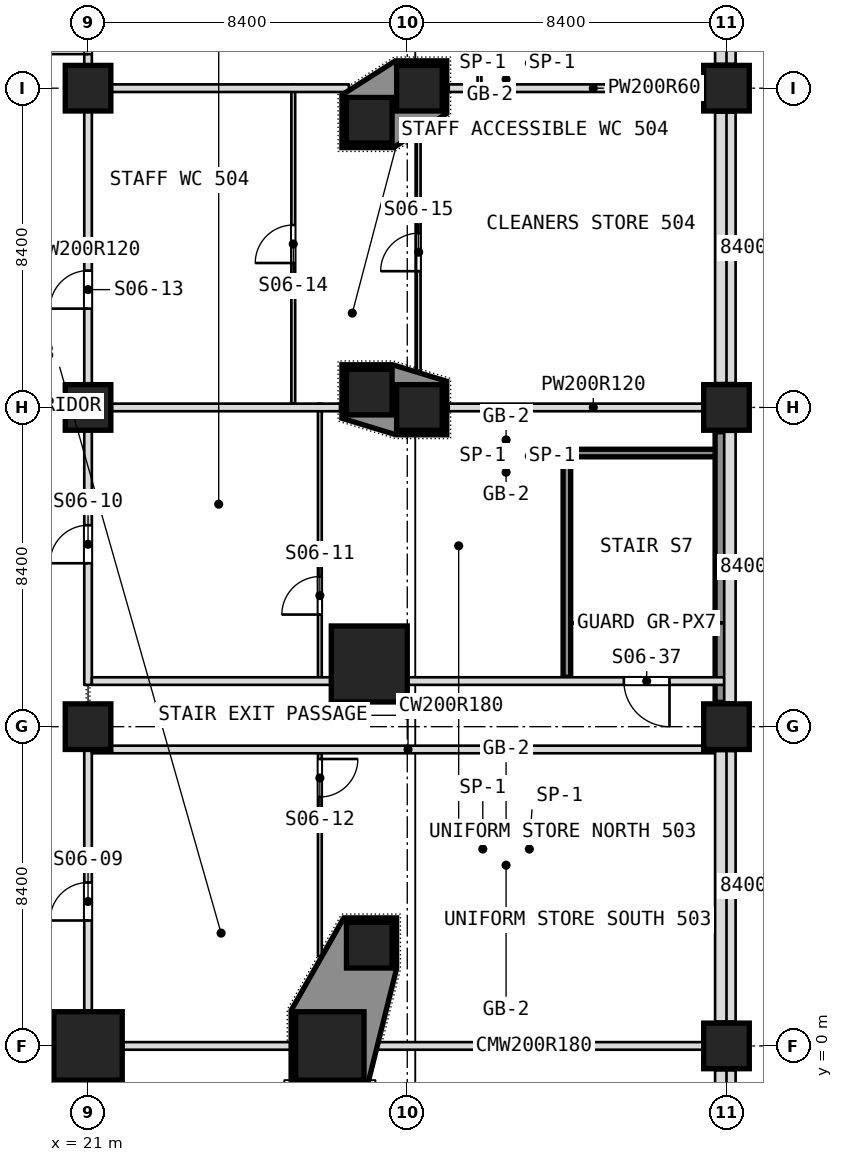
"""IFC4 building model, lengths in metres.
Left out: names, types, materials, properties, quantities, classifications, styles, units other than length and angle.
Written with IfcOpenShell. Run it as: python <this file> out.ifc"""

import sys

from ifc_helpers import new_model, si_unit, direction, frame, frame_2d, origin, origin_2d, place, context, subcontext, project, spatial, polyline, rectangle, outline, extrude, element, fill, save


model = new_model("IFC4")
c1 = context("Model", 3, precision=1e-05, world=origin(), true_north=direction((0.0, 1.0)))
c2 = subcontext(c1, "Body", "Model", "MODEL_VIEW")
j1 = project(units=[si_unit("LENGTHUNIT", "METRE"), si_unit("PLANEANGLEUNIT", "RADIAN")], contexts=[c1])
p1 = place(None, origin())
s1 = spatial("IfcSite", under=j1, at=p1, CompositionType="ELEMENT")
p2 = place(p1, origin())
s2 = spatial("IfcBuilding", under=s1, at=p2, CompositionType="ELEMENT")
p3 = place(p2, frame((0.0, 0.0, 31.0)))
s3 = spatial("IfcBuildingStorey", under=s2, at=p3, CompositionType="ELEMENT", Elevation=31.0)
p4 = place(p3, frame((21.0, 0.0, 0.0), z_axis=(0.0, 0.0, 1.0), x_axis=(1.0, 0.0, 0.0)))
e1 = element("IfcColumn", 1, at=p4, inside=s3, PredefinedType="COLUMN", context=c2, shape_type="SweptSolid", body=[
    extrude(rectangle(XDim=1.8, YDim=1.8, at=origin_2d()), origin(), (0.0, 0.0, 1.0), 5.5),
])
for number, where, z_axis, x_axis in (
    (2, (37.8, 0.0, 0.0), (0.0, 0.0, 1.0), (1.0, 0.0, 0.0)),
    (3, (21.0, 8.4, 0.0), (0.0, 0.0, 1.0), (1.0, 0.0, 0.0)),
    (4, (37.8, 8.4, 0.0), (0.0, 0.0, 1.0), (1.0, 0.0, 0.0)),
    (5, (21.0, 16.8, 0.0), (0.0, 0.0, 1.0), (1.0, 0.0, 0.0)),
    (6, (29.72, 16.8, 0.0), (0.0, 0.0, 1.0), (1.0, 0.0, 0.0)),
    (7, (37.8, 16.8, 0.0), (0.0, 0.0, 1.0), (1.0, 0.0, 0.0)),
    (8, (21.0, 25.2, 0.0), (0.0, 0.0, 1.0), (1.0, 0.0, 0.0)),
    (9, (29.72, 25.2, 0.0), (0.0, 0.0, 1.0), (1.0, 0.0, 0.0)),
    (10, (37.8, 25.2, 0.0), (0.0, 0.0, 1.0), (1.0, 0.0, 0.0)),
):
    element("IfcColumn", number, at=place(p3, frame(where, z_axis=z_axis, x_axis=x_axis)), inside=s3, PredefinedType="COLUMN", context=c2, shape_type="SweptSolid", body=[
        extrude(rectangle(XDim=1.2, YDim=1.2, at=origin_2d()), origin(), (0.0, 0.0, 1.0), 5.5),
    ])
p5 = place(p3, frame((27.363, 0.0, 0.0), z_axis=(0.0, 0.0, 1.0), x_axis=(1.0, 0.0, 0.0)))
e11 = element("IfcColumn", 11, at=p5, inside=s3, PredefinedType="COLUMN", context=c2, shape_type="SweptSolid", body=[
    extrude(rectangle(XDim=1.8, YDim=1.8, at=origin_2d()), origin(), (0.0, 0.0, 1.0), 5.5),
])
p6 = place(p3, frame((28.4, 10.05, 0.0), z_axis=(0.0, 0.0, 1.0), x_axis=(1.0, 0.0, 0.0)))
e12 = element("IfcColumn", 12, at=p6, inside=s3, PredefinedType="COLUMN", context=c2, shape_type="SweptSolid", body=[
    extrude(rectangle(XDim=2.0, YDim=2.0, at=origin_2d()), origin(), (0.0, 0.0, 1.0), 5.5),
])
for number, where, z_axis, x_axis in (
    (13, (28.4, 24.356, 0.0), (0.0, 0.0, 1.0), (1.0, 0.0, 0.0)),
    (14, (28.4, 17.203, 0.0), (0.0, 0.0, 1.0), (1.0, 0.0, 0.0)),
    (15, (28.4, 2.649, 0.0), (0.0, 0.0, 1.0), (1.0, 0.0, 0.0)),
):
    element("IfcColumn", number, at=place(p3, frame(where, z_axis=z_axis, x_axis=x_axis)), inside=s3, PredefinedType="COLUMN", context=c2, shape_type="SweptSolid", body=[
        extrude(rectangle(XDim=1.2, YDim=1.2, at=origin_2d()), origin(), (0.0, 0.0, 1.0), 5.5),
    ])
p7 = place(p3, frame((33.6, 9.7, 0.0), z_axis=(0.0, 0.0, 1.0), x_axis=(0.0, 1.0, 0.0)))
e16 = element("IfcWall", 16, at=p7, inside=s3, PredefinedType="PARTITIONING", context=c2, shape_type="SweptSolid", body=[
    extrude(rectangle(XDim=6.0, YDim=0.2, at=frame_2d((3.0, 0.0))), origin(), (0.0, 0.0, 1.0), 5.35),
])
p8 = place(p3, frame((31.3, 25.3, 0.0), z_axis=(0.0, 0.0, 1.0), x_axis=(0.0, 1.0, 0.0)))
e17 = element("IfcWall", 17, at=p8, inside=s3, PredefinedType="PARTITIONING", context=c2, shape_type="SweptSolid", body=[
    extrude(rectangle(XDim=16.64, YDim=0.1, at=frame_2d((8.32, 0.0))), origin(), (0.0, 0.0, 1.0), 5.35),
])
p9 = place(p8, frame((5.1, 0.0, 0.0)))
e18 = element("IfcOpeningElement", 18, at=p9, cuts=e17, PredefinedType="OPENING", context=c2, shape_type="SweptSolid", body=[
    extrude(rectangle(XDim=1.0, YDim=2.1, at=frame_2d((0.5, 1.05))), frame((0.0, 0.05, 0.0), z_axis=(0.0, -1.0, 0.0), x_axis=(1.0, 0.0, 0.0)), (0.0, 0.0, 1.0), 0.1),
])
p10 = place(p3, frame((29.7, 17.767, 0.0), z_axis=(0.0, 0.0, 1.0), x_axis=(0.0, 1.0, 0.0)))
e19 = element("IfcWall", 19, at=p10, inside=s3, PredefinedType="PARTITIONING", context=c2, shape_type="SweptSolid", body=[
    extrude(rectangle(XDim=6.235, YDim=0.1, at=frame_2d((3.117, 0.0))), origin(), (0.0, 0.0, 1.0), 5.35),
])
p11 = place(p10, frame((2.618, 0.0, 0.0)))
e20 = element("IfcOpeningElement", 20, at=p11, cuts=e19, PredefinedType="OPENING", context=c2, shape_type="SweptSolid", body=[
    extrude(rectangle(XDim=1.0, YDim=2.1, at=frame_2d((0.5, 1.05))), frame((0.0, 0.05, 0.0), z_axis=(0.0, -1.0, 0.0), x_axis=(1.0, 0.0, 0.0)), (0.0, 0.0, 1.0), 0.1),
])
p12 = place(p3, frame((27.1, 2.363, 0.0), z_axis=(0.0, 0.0, 1.0), x_axis=(0.0, 1.0, 0.0)))
e21 = element("IfcWall", 21, at=p12, inside=s3, PredefinedType="PARTITIONING", context=c2, shape_type="SweptSolid", body=[
    extrude(rectangle(XDim=5.337, YDim=0.1, at=frame_2d((2.668, 0.0))), origin(), (0.0, 0.0, 1.0), 5.35),
])
p13 = place(p12, frame((4.187, 0.0, 0.0)))
e22 = element("IfcOpeningElement", 22, at=p13, cuts=e21, PredefinedType="OPENING", context=c2, shape_type="SweptSolid", body=[
    extrude(rectangle(XDim=1.0, YDim=2.1, at=frame_2d((0.5, 1.05))), frame((0.0, 0.05, 0.0), z_axis=(0.0, -1.0, 0.0), x_axis=(1.0, 0.0, 0.0)), (0.0, 0.0, 1.0), 0.1),
])
p14 = place(p3, frame((27.1, 9.7, 0.0), z_axis=(0.0, 0.0, 1.0), x_axis=(0.0, 1.0, 0.0)))
e23 = element("IfcWall", 23, at=p14, inside=s3, PredefinedType="PARTITIONING", context=c2, shape_type="SweptSolid", body=[
    extrude(rectangle(XDim=7.2, YDim=0.1, at=frame_2d((3.6, 0.0))), origin(), (0.0, 0.0, 1.0), 5.35),
])
p15 = place(p14, frame((1.65, 0.0, 0.0)))
e24 = element("IfcOpeningElement", 24, at=p15, cuts=e23, PredefinedType="OPENING", context=c2, shape_type="SweptSolid", body=[
    extrude(rectangle(XDim=1.0, YDim=2.1, at=frame_2d((0.5, 1.05))), frame((0.0, 0.05, 0.0), z_axis=(0.0, -1.0, 0.0), x_axis=(1.0, 0.0, 0.0)), (0.0, 0.0, 1.0), 0.1),
])
p16 = place(p3, frame((26.4, 16.9, 0.0), z_axis=(0.0, 0.0, 1.0), x_axis=(0.0, 1.0, 0.0)))
e25 = element("IfcWall", 25, at=p16, inside=s3, PredefinedType="PARTITIONING", context=c2, shape_type="SweptSolid", body=[
    extrude(rectangle(XDim=8.4, YDim=0.1, at=frame_2d((4.2, 0.0))), origin(), (0.0, 0.0, 1.0), 5.35),
])
p17 = place(p16, frame((3.7, 0.0, 0.0)))
e26 = element("IfcOpeningElement", 26, at=p17, cuts=e25, PredefinedType="OPENING", context=c2, shape_type="SweptSolid", body=[
    extrude(rectangle(XDim=1.0, YDim=2.1, at=frame_2d((0.5, 1.05))), frame((0.0, 0.05, 0.0), z_axis=(0.0, -1.0, 0.0), x_axis=(1.0, 0.0, 0.0)), (0.0, 0.0, 1.0), 0.1),
])
p18 = place(p3, frame((21.0, -0.3, 0.0), z_axis=(0.0, 0.0, 1.0), x_axis=(0.0, 1.0, 0.0)))
e27 = element("IfcWall", 27, at=p18, inside=s3, PredefinedType="PARTITIONING", context=c2, shape_type="SweptSolid", body=[
    extrude(rectangle(XDim=8.2, YDim=0.2, at=frame_2d((4.1, 0.0))), origin(), (0.0, 0.0, 1.0), 4.95),
])
p19 = place(p18, frame((3.6, 0.0, 0.0)))
e28 = element("IfcOpeningElement", 28, at=p19, cuts=e27, PredefinedType="OPENING", context=c2, shape_type="SweptSolid", body=[
    extrude(rectangle(XDim=1.0, YDim=2.1, at=frame_2d((0.5, 1.05))), frame((0.0, 0.1, 0.0), z_axis=(0.0, -1.0, 0.0), x_axis=(1.0, 0.0, 0.0)), (0.0, 0.0, 1.0), 0.2),
])
p20 = place(p3, frame((21.0, 9.5, 0.0), z_axis=(0.0, 0.0, 1.0), x_axis=(0.0, 1.0, 0.0)))
e29 = element("IfcWall", 29, at=p20, inside=s3, PredefinedType="PARTITIONING", context=c2, shape_type="SweptSolid", body=[
    extrude(rectangle(XDim=22.894, YDim=0.2, at=frame_2d((11.447, 0.0))), origin(), (0.0, 0.0, 1.0), 4.95),
])
p21 = place(p20, frame((3.2, 0.0, 0.0)))
e30 = element("IfcOpeningElement", 30, at=p21, cuts=e29, PredefinedType="OPENING", context=c2, shape_type="SweptSolid", body=[
    extrude(rectangle(XDim=1.0, YDim=2.1, at=frame_2d((0.5, 1.05))), frame((0.0, 0.1, 0.0), z_axis=(0.0, -1.0, 0.0), x_axis=(1.0, 0.0, 0.0)), (0.0, 0.0, 1.0), 0.2),
])
p22 = place(p20, frame((9.9, 0.0, 0.0)))
e31 = element("IfcOpeningElement", 31, at=p22, cuts=e29, PredefinedType="OPENING", context=c2, shape_type="SweptSolid", body=[
    extrude(rectangle(XDim=1.0, YDim=2.1, at=frame_2d((0.5, 1.05))), frame((0.0, 0.1, 0.0), z_axis=(0.0, -1.0, 0.0), x_axis=(1.0, 0.0, 0.0)), (0.0, 0.0, 1.0), 0.2),
])
p23 = place(p20, frame((16.597, 0.0, 0.0)))
e32 = element("IfcOpeningElement", 32, at=p23, cuts=e29, PredefinedType="OPENING", context=c2, shape_type="SweptSolid", body=[
    extrude(rectangle(XDim=1.8, YDim=2.1, at=frame_2d((0.9, 1.05))), frame((0.0, 0.1, 0.0), z_axis=(0.0, -1.0, 0.0), x_axis=(1.0, 0.0, 0.0)), (0.0, 0.0, 1.0), 0.2),
])
p24 = place(p3, frame((21.1, 7.8, 0.0), z_axis=(0.0, 0.0, 1.0), x_axis=(1.0, 0.0, 0.0)))
e33 = element("IfcWall", 33, at=p24, inside=s3, PredefinedType="PARTITIONING", context=c2, shape_type="SweptSolid", body=[
    extrude(rectangle(XDim=16.64, YDim=0.2, at=frame_2d((8.32, 0.0))), origin(), (0.0, 0.0, 1.0), 5.35),
])
p25 = place(p3, frame((21.1, 9.6, 0.0), z_axis=(0.0, 0.0, 1.0), x_axis=(1.0, 0.0, 0.0)))
e34 = element("IfcWall", 34, at=p25, inside=s3, PredefinedType="PARTITIONING", context=c2, shape_type="SweptSolid", body=[
    extrude(rectangle(XDim=16.64, YDim=0.2, at=frame_2d((8.32, 0.0))), origin(), (0.0, 0.0, 1.0), 5.35),
])
p26 = place(p25, frame((14.0, 0.0, 0.0)))
e35 = element("IfcOpeningElement", 35, at=p26, cuts=e34, PredefinedType="OPENING", context=c2, shape_type="SweptSolid", body=[
    extrude(rectangle(XDim=1.2, YDim=2.1, at=frame_2d((0.6, 1.05))), frame((0.0, 0.1, 0.0), z_axis=(0.0, -1.0, 0.0), x_axis=(1.0, 0.0, 0.0)), (0.0, 0.0, 1.0), 0.2),
])
p27 = place(p3, frame((33.7, 15.6, 0.0), z_axis=(0.0, 0.0, 1.0), x_axis=(1.0, 0.0, 0.0)))
e36 = element("IfcWall", 36, at=p27, inside=s3, PredefinedType="PARTITIONING", context=c2, shape_type="SweptSolid", body=[
    extrude(rectangle(XDim=4.04, YDim=0.2, at=frame_2d((2.02, 0.0))), origin(), (0.0, 0.0, 1.0), 5.35),
])
p28 = place(p3, frame((21.1, 16.8, 0.0), z_axis=(0.0, 0.0, 1.0), x_axis=(1.0, 0.0, 0.0)))
e37 = element("IfcWall", 37, at=p28, inside=s3, PredefinedType="PARTITIONING", context=c2, shape_type="SweptSolid", body=[
    extrude(rectangle(XDim=6.53, YDim=0.2, at=frame_2d((3.265, 0.0))), origin(), (0.0, 0.0, 1.0), 4.85),
])
p29 = place(p3, frame((30.49, 16.8, 0.0), z_axis=(0.0, 0.0, 1.0), x_axis=(1.0, 0.0, 0.0)))
e38 = element("IfcWall", 38, at=p29, inside=s3, PredefinedType="PARTITIONING", context=c2, shape_type="SweptSolid", body=[
    extrude(rectangle(XDim=7.61, YDim=0.2, at=frame_2d((3.805, 0.0))), origin(), (0.0, 0.0, 1.0), 5.35),
])
p30 = place(p3, frame((21.1, 25.2, 0.0), z_axis=(0.0, 0.0, 1.0), x_axis=(1.0, 0.0, 0.0)))
e39 = element("IfcWall", 39, at=p30, inside=s3, PredefinedType="PARTITIONING", context=c2, shape_type="SweptSolid", body=[
    extrude(rectangle(XDim=6.765, YDim=0.2, at=frame_2d((3.382, 0.0))), origin(), (0.0, 0.0, 1.0), 4.85),
])
p31 = place(p3, frame((30.49, 25.2, 0.0), z_axis=(0.0, 0.0, 1.0), x_axis=(1.0, 0.0, 0.0)))
e40 = element("IfcWall", 40, at=p31, inside=s3, PredefinedType="PARTITIONING", context=c2, shape_type="SweptSolid", body=[
    extrude(rectangle(XDim=7.61, YDim=0.2, at=frame_2d((3.805, 0.0))), origin(), (0.0, 0.0, 1.0), 5.35),
])
for number, where, z_axis, x_axis in (
    (41, (37.89, -7.76, 0.0), (0.0, 0.0, 1.0), (0.0, 1.0, 0.0)),
    (42, (37.89, 0.64, 0.0), (0.0, 0.0, 1.0), (0.0, 1.0, 0.0)),
):
    element("IfcWall", number, at=place(p3, frame(where, z_axis=z_axis, x_axis=x_axis)), inside=s3, PredefinedType="NOTDEFINED", context=c2, shape_type="SweptSolid", body=[
        extrude(rectangle(XDim=7.12, YDim=0.3, at=frame_2d((3.56, 0.0))), origin(), (0.0, 0.0, 1.0), 4.18),
    ])
p32 = place(p3, frame((37.89, 9.04, 0.0), z_axis=(0.0, 0.0, 1.0), x_axis=(0.0, 1.0, 0.0)))
e43 = element("IfcWall", 43, at=p32, inside=s3, PredefinedType="NOTDEFINED", context=c2, shape_type="SweptSolid", body=[
    extrude(rectangle(XDim=7.12, YDim=0.3, at=frame_2d((3.56, 0.0))), origin(), (0.0, 0.0, 1.0), 5.5),
])
p33 = place(p3, frame((37.89, 17.44, 0.0), z_axis=(0.0, 0.0, 1.0), x_axis=(0.0, 1.0, 0.0)))
e44 = element("IfcWall", 44, at=p33, inside=s3, PredefinedType="NOTDEFINED", context=c2, shape_type="SweptSolid", body=[
    extrude(rectangle(XDim=7.12, YDim=0.3, at=frame_2d((3.56, 0.0))), origin(), (0.0, 0.0, 1.0), 4.18),
])
p34 = place(p3, frame((37.89, 25.84, 0.0), z_axis=(0.0, 0.0, 1.0), x_axis=(0.0, 1.0, 0.0)))
e45 = element("IfcWall", 45, at=p34, inside=s3, PredefinedType="NOTDEFINED", context=c2, shape_type="SweptSolid", body=[
    extrude(rectangle(XDim=7.12, YDim=0.3, at=frame_2d((3.56, 0.0))), origin(), (0.0, 0.0, 1.0), 4.18),
])
p35 = place(p3, frame((37.65, 32.96, 5.5), z_axis=(0.0, 0.0, 1.0), x_axis=(0.0, -1.0, 0.0)))
e46 = element("IfcWall", 46, at=p35, inside=s3, PredefinedType="PARAPET", context=c2, shape_type="SweptSolid", body=[
    extrude(rectangle(XDim=7.12, YDim=0.3, at=frame_2d((3.56, 0.0))), origin(), (0.0, 0.0, 1.0), 1.1),
])
p36 = place(p3, frame((37.65, 24.56, 5.5), z_axis=(0.0, 0.0, 1.0), x_axis=(0.0, -1.0, 0.0)))
e47 = element("IfcWall", 47, at=p36, inside=s3, PredefinedType="PARAPET", context=c2, shape_type="SweptSolid", body=[
    extrude(rectangle(XDim=7.12, YDim=0.3, at=frame_2d((3.56, 0.0))), origin(), (0.0, 0.0, 1.0), 1.1),
])
p37 = place(p3, frame((37.65, 16.16, 5.5), z_axis=(0.0, 0.0, 1.0), x_axis=(0.0, -1.0, 0.0)))
e48 = element("IfcWall", 48, at=p37, inside=s3, PredefinedType="PARAPET", context=c2, shape_type="SweptSolid", body=[
    extrude(rectangle(XDim=7.12, YDim=0.3, at=frame_2d((3.56, 0.0))), origin(), (0.0, 0.0, 1.0), 1.1),
])
for number, where, z_axis, x_axis in (
    (49, (37.65, 7.76, 5.5), (0.0, 0.0, 1.0), (0.0, -1.0, 0.0)),
    (50, (37.65, -0.64, 5.5), (0.0, 0.0, 1.0), (0.0, -1.0, 0.0)),
):
    element("IfcWall", number, at=place(p3, frame(where, z_axis=z_axis, x_axis=x_axis)), inside=s3, PredefinedType="PARAPET", context=c2, shape_type="SweptSolid", body=[
        extrude(rectangle(XDim=7.12, YDim=0.3, at=frame_2d((3.56, 0.0))), origin(), (0.0, 0.0, 1.0), 1.1),
    ])
p38 = place(p3, origin())
e51 = element("IfcWall", 51, at=p38, inside=s3, PredefinedType="SOLIDWALL", context=c2, shape_type="SweptSolid", body=[
    extrude(outline(polyline([(27.68, 25.022), (29.085, 25.92), (30.44, 25.92), (30.44, 24.534), (29.035, 23.636), (27.68, 23.636), (27.68, 25.022)]), holes=[polyline([(29.12, 24.6), (30.32, 24.6), (30.32, 25.8), (29.12, 25.8), (29.12, 24.6)]), polyline([(27.8, 23.756), (29.0, 23.756), (29.0, 24.956), (27.8, 24.956), (27.8, 23.756)])]), origin(), (0.0, 0.0, 1.0), 5.5),
])
p39 = place(p3, origin())
e52 = element("IfcWall", 52, at=p39, inside=s3, PredefinedType="SOLIDWALL", context=c2, shape_type="SweptSolid", body=[
    extrude(outline(polyline([(27.68, 16.514), (27.68, 17.923), (29.018, 17.923), (30.44, 17.489), (30.44, 16.08), (29.102, 16.08), (27.68, 16.514)]), holes=[polyline([(29.12, 16.2), (30.32, 16.2), (30.32, 17.4), (29.12, 17.4), (29.12, 16.2)]), polyline([(27.8, 16.603), (29.0, 16.603), (29.0, 17.803), (27.8, 17.803), (27.8, 16.603)])]), origin(), (0.0, 0.0, 1.0), 5.5),
])
p40 = place(p3, origin())
e53 = element("IfcWall", 53, at=p40, inside=s3, PredefinedType="SOLIDWALL", context=c2, shape_type="SweptSolid", body=[
    extrude(outline(polyline([(26.343, 0.932), (27.73, 3.369), (29.12, 3.369), (29.12, 2.034), (28.357, -1.02), (26.343, -1.02), (26.343, 0.932)]), holes=[polyline([(27.8, 2.049), (29.0, 2.049), (29.0, 3.249), (27.8, 3.249), (27.8, 2.049)]), polyline([(26.463, -0.9), (28.263, -0.9), (28.263, 0.9), (26.463, 0.9), (26.463, -0.9)])]), origin(), (0.0, 0.0, 1.0), 5.5),
])
p41 = place(p3, frame((16.901, 0.0, 0.0), z_axis=(0.0, 0.0, 1.0), x_axis=(1.0, 0.0, 0.0)))
e54 = element("IfcWall", 54, at=p41, inside=s3, PredefinedType="PARTITIONING", context=c2, shape_type="SweptSolid", body=[
    extrude(rectangle(XDim=3.198, YDim=0.2, at=frame_2d((1.599, 0.0))), origin(), (0.0, 0.0, 1.0), 4.85),
])
p42 = place(p41, frame((0.399, 0.0, 0.0)))
e55 = element("IfcOpeningElement", 55, at=p42, cuts=e54, PredefinedType="OPENING", context=c2, shape_type="SweptSolid", body=[
    extrude(rectangle(XDim=2.4, YDim=2.1, at=frame_2d((1.2, 1.05))), frame((0.0, 0.1, 0.0), z_axis=(0.0, -1.0, 0.0), x_axis=(1.0, 0.0, 0.0)), (0.0, 0.0, 1.0), 0.2),
])
p43 = place(p3, frame((21.901, 0.0, 0.0), z_axis=(0.0, 0.0, 1.0), x_axis=(1.0, 0.0, 0.0)))
e56 = element("IfcWall", 56, at=p43, inside=s3, PredefinedType="PARTITIONING", context=c2, shape_type="SweptSolid", body=[
    extrude(rectangle(XDim=4.561, YDim=0.2, at=frame_2d((2.281, 0.0))), origin(), (0.0, 0.0, 1.0), 4.85),
])
p44 = place(p3, frame((28.264, 0.0, 0.0), z_axis=(0.0, 0.0, 1.0), x_axis=(1.0, 0.0, 0.0)))
e57 = element("IfcWall", 57, at=p44, inside=s3, PredefinedType="PARTITIONING", context=c2, shape_type="SweptSolid", body=[
    extrude(rectangle(XDim=8.935, YDim=0.2, at=frame_2d((4.468, 0.0))), origin(), (0.0, 0.0, 1.0), 3.58),
])
p45 = place(p19, origin())
e58 = element("IfcDoor", 58, at=p45, inside=s3, OperationType="SINGLE_SWING_RIGHT", PredefinedType="DOOR", context=c2, shape_type="SweptSolid", body=[
    extrude(rectangle(XDim=1.0, YDim=2.1, at=frame_2d((0.5, 1.05))), frame((0.0, 0.025, 0.0), z_axis=(0.0, -1.0, 0.0), x_axis=(1.0, 0.0, 0.0)), (0.0, 0.0, 1.0), 0.05),
])
fill(e28, e58)
p46 = place(p21, origin())
e59 = element("IfcDoor", 59, at=p46, inside=s3, OperationType="SINGLE_SWING_LEFT", PredefinedType="DOOR", context=c2, shape_type="SweptSolid", body=[
    extrude(rectangle(XDim=1.0, YDim=2.1, at=frame_2d((0.5, 1.05))), frame((0.0, 0.025, 0.0), z_axis=(0.0, -1.0, 0.0), x_axis=(1.0, 0.0, 0.0)), (0.0, 0.0, 1.0), 0.05),
])
fill(e30, e59)
p47 = place(p15, origin())
e60 = element("IfcDoor", 60, at=p47, inside=s3, OperationType="SINGLE_SWING_RIGHT", PredefinedType="DOOR", context=c2, shape_type="SweptSolid", body=[
    extrude(rectangle(XDim=1.0, YDim=2.1, at=frame_2d((0.5, 1.05))), frame((0.0, 0.025, 0.0), z_axis=(0.0, -1.0, 0.0), x_axis=(1.0, 0.0, 0.0)), (0.0, 0.0, 1.0), 0.05),
])
fill(e24, e60)
p48 = place(p13, origin())
e61 = element("IfcDoor", 61, at=p48, inside=s3, OperationType="SINGLE_SWING_LEFT", PredefinedType="DOOR", context=c2, shape_type="SweptSolid", body=[
    extrude(rectangle(XDim=1.0, YDim=2.1, at=frame_2d((0.5, 1.05))), frame((0.0, 0.025, 0.0), z_axis=(0.0, -1.0, 0.0), x_axis=(1.0, 0.0, 0.0)), (0.0, 0.0, 1.0), 0.05),
])
fill(e22, e61)
p49 = place(p22, origin())
e62 = element("IfcDoor", 62, at=p49, inside=s3, OperationType="SINGLE_SWING_RIGHT", PredefinedType="DOOR", context=c2, shape_type="SweptSolid", body=[
    extrude(rectangle(XDim=1.0, YDim=2.1, at=frame_2d((0.5, 1.05))), frame((0.0, 0.025, 0.0), z_axis=(0.0, -1.0, 0.0), x_axis=(1.0, 0.0, 0.0)), (0.0, 0.0, 1.0), 0.05),
])
fill(e31, e62)
p50 = place(p17, origin())
e63 = element("IfcDoor", 63, at=p50, inside=s3, OperationType="SINGLE_SWING_LEFT", PredefinedType="DOOR", context=c2, shape_type="SweptSolid", body=[
    extrude(rectangle(XDim=1.0, YDim=2.1, at=frame_2d((0.5, 1.05))), frame((0.0, 0.025, 0.0), z_axis=(0.0, -1.0, 0.0), x_axis=(1.0, 0.0, 0.0)), (0.0, 0.0, 1.0), 0.05),
])
fill(e26, e63)
p51 = place(p11, origin())
e64 = element("IfcDoor", 64, at=p51, inside=s3, OperationType="SINGLE_SWING_LEFT", PredefinedType="DOOR", context=c2, shape_type="SweptSolid", body=[
    extrude(rectangle(XDim=1.0, YDim=2.1, at=frame_2d((0.5, 1.05))), frame((0.0, 0.025, 0.0), z_axis=(0.0, -1.0, 0.0), x_axis=(1.0, 0.0, 0.0)), (0.0, 0.0, 1.0), 0.05),
])
fill(e20, e64)
p52 = place(p23, origin())
e65 = element("IfcDoor", 65, at=p52, inside=s3, OperationType="DOUBLE_DOOR_SINGLE_SWING", PredefinedType="DOOR", context=c2, shape_type="SweptSolid", body=[
    extrude(rectangle(XDim=1.8, YDim=2.1, at=frame_2d((0.9, 1.05))), frame((0.0, 0.025, 0.0), z_axis=(0.0, -1.0, 0.0), x_axis=(1.0, 0.0, 0.0)), (0.0, 0.0, 1.0), 0.05),
])
fill(e32, e65)
p53 = place(p26, origin())
e66 = element("IfcDoor", 66, at=p53, inside=s3, OperationType="SINGLE_SWING_LEFT", PredefinedType="DOOR", context=c2, shape_type="SweptSolid", body=[
    extrude(rectangle(XDim=1.2, YDim=2.1, at=frame_2d((0.6, 1.05))), frame((0.0, 0.025, 0.0), z_axis=(0.0, -1.0, 0.0), x_axis=(1.0, 0.0, 0.0)), (0.0, 0.0, 1.0), 0.05),
])
fill(e35, e66)
save(model, sys.argv[1])
